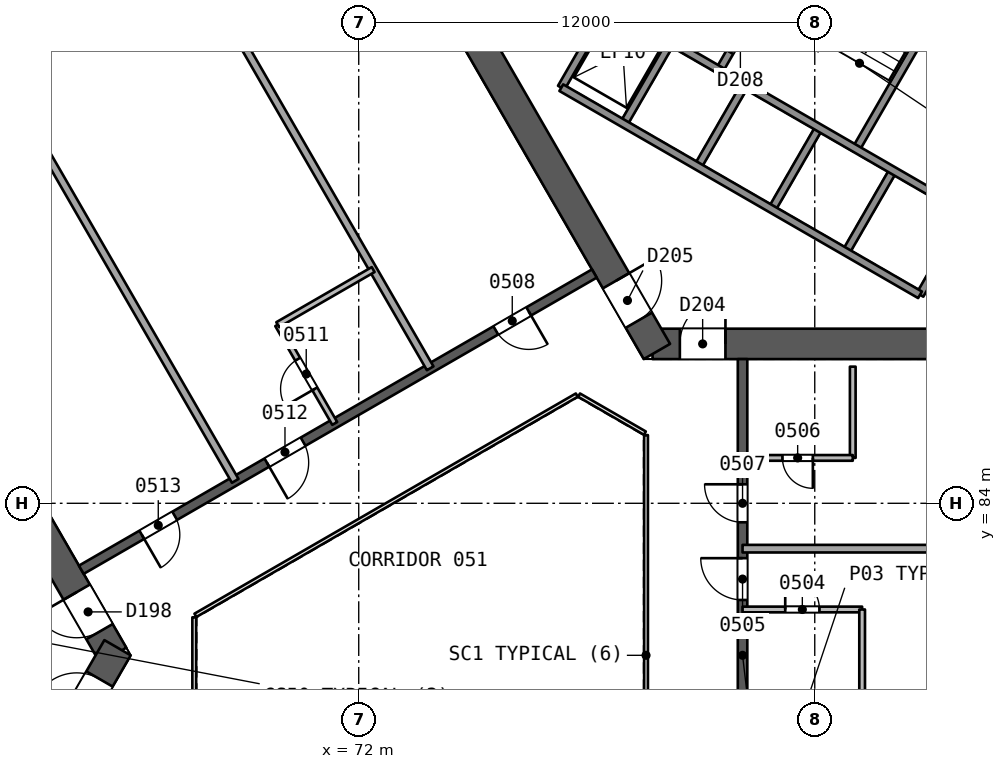
"""IFC4 building model, lengths in metres.
Left out: names, types, materials, properties, quantities, classifications, styles, units other than length and angle.
Written with IfcOpenShell. Run it as: python <this file> out.ifc"""

import sys

from ifc_helpers import new_model, si_unit, direction, frame, frame_2d, origin, place, context, subcontext, project, spatial, rectangle, extrude, element, fill, save


model = new_model("IFC4")
c1 = context("Model", 3, precision=1e-05, world=origin(), true_north=direction((0.0, 1.0)))
c2 = subcontext(c1, "Body", "Model", "MODEL_VIEW")
j1 = project(units=[si_unit("LENGTHUNIT", "METRE"), si_unit("PLANEANGLEUNIT", "RADIAN")], contexts=[c1])
p1 = place(None, origin())
s1 = spatial("IfcSite", under=j1, at=p1, CompositionType="ELEMENT")
p2 = place(p1, origin())
s2 = spatial("IfcBuilding", under=s1, at=p2, CompositionType="ELEMENT")
p3 = place(p2, frame((0.0, 0.0, 30.0)))
s3 = spatial("IfcBuildingStorey", under=s2, at=p3, CompositionType="ELEMENT", Elevation=30.0)
p4 = place(p3, frame((65.538, 80.0, 0.0), z_axis=(0.0, 0.0, 1.0), x_axis=(-0.49999662545, 0.866027352073, 0.0)))
e1 = element("IfcWall", 1, at=p4, inside=s3, PredefinedType="SHEAR", context=c2, shape_type="SweptSolid", body=[
    extrude(rectangle(XDim=10.149, YDim=0.8, at=frame_2d((5.074, 0.0))), origin(), (0.0, 0.0, 1.0), 3.7),
])
p5 = place(p4, frame((0.719, 0.0, 0.0)))
e2 = element("IfcOpeningElement", 2, at=p5, cuts=e1, PredefinedType="OPENING", context=c2, shape_type="SweptSolid", body=[
    extrude(rectangle(XDim=1.2, YDim=2.1, at=frame_2d((0.6, 1.05))), frame((0.0, 0.411, 0.0), z_axis=(0.0, -1.0, 0.0), x_axis=(1.0, 0.0, 0.0)), (0.0, 0.0, 1.0), 0.821),
])
p6 = place(p3, frame((60.664, 71.557, 0.0), z_axis=(0.0, 0.0, 1.0), x_axis=(0.50000409368, 0.866023040284, 0.0)))
e3 = element("IfcWall", 3, at=p6, inside=s3, PredefinedType="SHEAR", context=c2, shape_type="SweptSolid", body=[
    extrude(rectangle(XDim=9.98, YDim=0.8, at=frame_2d((4.99, 0.0))), origin(), (0.0, 0.0, 1.0), 3.7),
])
p7 = place(p6, frame((7.83, 0.0, 0.0)))
e4 = element("IfcOpeningElement", 4, at=p7, cuts=e3, PredefinedType="OPENING", context=c2, shape_type="SweptSolid", body=[
    extrude(rectangle(XDim=1.2, YDim=2.1, at=frame_2d((0.6, 1.05))), frame((0.0, 0.411, 0.0), z_axis=(0.0, -1.0, 0.0), x_axis=(1.0, 0.0, 0.0)), (0.0, 0.0, 1.0), 0.821),
])
p8 = place(p3, frame((79.731, 88.194, 0.0), z_axis=(0.0, 0.0, 1.0), x_axis=(1.0, 0.0, 0.0)))
e5 = element("IfcWall", 5, at=p8, inside=s3, PredefinedType="SHEAR", context=c2, shape_type="SweptSolid", body=[
    extrude(rectangle(XDim=10.149, YDim=0.8, at=frame_2d((5.074, 0.0))), origin(), (0.0, 0.0, 1.0), 3.7),
])
p9 = place(p8, frame((0.719, 0.0, 0.0)))
e6 = element("IfcOpeningElement", 6, at=p9, cuts=e5, PredefinedType="OPENING", context=c2, shape_type="SweptSolid", body=[
    extrude(rectangle(XDim=1.2, YDim=2.1, at=frame_2d((0.6, 1.05))), frame((0.0, 0.411, 0.0), z_axis=(0.0, -1.0, 0.0), x_axis=(1.0, 0.0, 0.0)), (0.0, 0.0, 1.0), 0.821),
])
p10 = place(p3, frame((74.856, 96.637, 0.0), z_axis=(0.0, 0.0, 1.0), x_axis=(0.499993500917, -0.866029155999, 0.0)))
e7 = element("IfcWall", 7, at=p10, inside=s3, PredefinedType="SHEAR", context=c2, shape_type="SweptSolid", body=[
    extrude(rectangle(XDim=9.98, YDim=0.8, at=frame_2d((4.99, 0.0))), origin(), (0.0, 0.0, 1.0), 3.7),
])
p11 = place(p10, frame((7.83, 0.0, 0.0)))
e8 = element("IfcOpeningElement", 8, at=p11, cuts=e7, PredefinedType="OPENING", context=c2, shape_type="SweptSolid", body=[
    extrude(rectangle(XDim=1.2, YDim=2.1, at=frame_2d((0.6, 1.05))), frame((0.0, 0.411, 0.0), z_axis=(0.0, -1.0, 0.0), x_axis=(1.0, 0.0, 0.0)), (0.0, 0.0, 1.0), 0.821),
])
p12 = place(p3, frame((82.1, 72.206, 0.0), z_axis=(0.0, 0.0, 1.0), x_axis=(0.0, 1.0, 0.0)))
e9 = element("IfcWall", 9, at=p12, inside=s3, PredefinedType="SHEAR", context=c2, shape_type="SweptSolid", body=[
    extrude(rectangle(XDim=15.588, YDim=0.25, at=frame_2d((7.794, 0.0))), origin(), (0.0, 0.0, 1.0), 3.2),
])
p13 = place(p12, frame((2.618, 0.0, 0.0)))
e10 = element("IfcOpeningElement", 10, at=p13, cuts=e9, PredefinedType="OPENING", context=c2, shape_type="SweptSolid", body=[
    extrude(rectangle(XDim=1.0, YDim=2.1, at=frame_2d((0.5, 1.05))), frame((0.0, 0.135, 0.0), z_axis=(0.0, -1.0, 0.0), x_axis=(1.0, 0.0, 0.0)), (0.0, 0.0, 1.0), 0.271),
])
p14 = place(p12, frame((9.25, 0.0, 0.0)))
e11 = element("IfcOpeningElement", 11, at=p14, cuts=e9, PredefinedType="OPENING", context=c2, shape_type="SweptSolid", body=[
    extrude(rectangle(XDim=1.1, YDim=2.1, at=frame_2d((0.55, 1.05))), frame((0.0, 0.135, 0.0), z_axis=(0.0, -1.0, 0.0), x_axis=(1.0, 0.0, 0.0)), (0.0, 0.0, 1.0), 0.271),
])
p15 = place(p12, frame((11.294, 0.0, 0.0)))
e12 = element("IfcOpeningElement", 12, at=p15, cuts=e9, PredefinedType="OPENING", context=c2, shape_type="SweptSolid", body=[
    extrude(rectangle(XDim=1.0, YDim=2.1, at=frame_2d((0.5, 1.05))), frame((0.0, 0.135, 0.0), z_axis=(0.0, -1.0, 0.0), x_axis=(1.0, 0.0, 0.0)), (0.0, 0.0, 1.0), 0.271),
])
p16 = place(p3, frame((78.2, 90.046, 0.0), z_axis=(0.0, 0.0, 1.0), x_axis=(-0.866026492143, -0.499998114903, 0.0)))
e13 = element("IfcWall", 13, at=p16, inside=s3, PredefinedType="SHEAR", context=c2, shape_type="SweptSolid", body=[
    extrude(rectangle(XDim=15.588, YDim=0.25, at=frame_2d((7.794, 0.0))), origin(), (0.0, 0.0, 1.0), 3.2),
])
p17 = place(p16, frame((1.994, 0.0, 0.0)))
e14 = element("IfcOpeningElement", 14, at=p17, cuts=e13, PredefinedType="OPENING", context=c2, shape_type="SweptSolid", body=[
    extrude(rectangle(XDim=1.0, YDim=2.1, at=frame_2d((0.5, 1.05))), frame((0.0, 0.135, 0.0), z_axis=(0.0, -1.0, 0.0), x_axis=(1.0, 0.0, 0.0)), (0.0, 0.0, 1.0), 0.271),
])
p18 = place(p16, frame((8.85, 0.0, 0.0)))
e15 = element("IfcOpeningElement", 15, at=p18, cuts=e13, PredefinedType="OPENING", context=c2, shape_type="SweptSolid", body=[
    extrude(rectangle(XDim=1.1, YDim=2.1, at=frame_2d((0.55, 1.05))), frame((0.0, 0.135, 0.0), z_axis=(0.0, -1.0, 0.0), x_axis=(1.0, 0.0, 0.0)), (0.0, 0.0, 1.0), 0.271),
])
p19 = place(p16, frame((12.75, 0.0, 0.0)))
e16 = element("IfcOpeningElement", 16, at=p19, cuts=e13, PredefinedType="OPENING", context=c2, shape_type="SweptSolid", body=[
    extrude(rectangle(XDim=1.0, YDim=2.1, at=frame_2d((0.5, 1.05))), frame((0.0, 0.135, 0.0), z_axis=(0.0, -1.0, 0.0), x_axis=(1.0, 0.0, 0.0)), (0.0, 0.0, 1.0), 0.271),
])
p20 = place(p3, frame((82.1, 81.206, 0.0), z_axis=(0.0, 0.0, 1.0), x_axis=(1.0, 0.0, 0.0)))
e17 = element("IfcWall", 17, at=p20, inside=s3, PredefinedType="PARTITIONING", context=c2, shape_type="SweptSolid", body=[
    extrude(rectangle(XDim=3.147, YDim=0.15, at=frame_2d((1.573, 0.0))), origin(), (0.0, 0.0, 1.0), 3.2),
])
p21 = place(p20, frame((1.123, 0.0, 0.0)))
e18 = element("IfcOpeningElement", 18, at=p21, cuts=e17, PredefinedType="OPENING", context=c2, shape_type="SweptSolid", body=[
    extrude(rectangle(XDim=0.9, YDim=2.1, at=frame_2d((0.45, 1.05))), frame((0.0, 0.085, 0.0), z_axis=(0.0, -1.0, 0.0), x_axis=(1.0, 0.0, 0.0)), (0.0, 0.0, 1.0), 0.171),
])
p22 = place(p3, frame((85.247, 81.206, 0.0), z_axis=(0.0, 0.0, 1.0), x_axis=(0.0, -1.0, 0.0)))
e19 = element("IfcWall", 19, at=p22, inside=s3, PredefinedType="PARTITIONING", context=c2, shape_type="SweptSolid", body=[
    extrude(rectangle(XDim=2.765, YDim=0.15, at=frame_2d((1.382, 0.0))), origin(), (0.0, 0.0, 1.0), 3.2),
])
p23 = place(p3, frame((96.351, 82.806, 0.0), z_axis=(0.0, 0.0, 1.0), x_axis=(-1.0, 0.0, 0.0)))
e20 = element("IfcWall", 20, at=p23, inside=s3, PredefinedType="PARTITIONING", context=c2, shape_type="SweptSolid", body=[
    extrude(rectangle(XDim=14.251, YDim=0.2, at=frame_2d((7.125, 0.0))), origin(), (0.0, 0.0, 1.0), 3.2),
])
p24 = place(p3, frame((85.0, 87.595, 0.0), z_axis=(0.0, 0.0, 1.0), x_axis=(0.0, -1.0, 0.0)))
e21 = element("IfcWall", 21, at=p24, inside=s3, PredefinedType="PARTITIONING", context=c2, shape_type="SweptSolid", body=[
    extrude(rectangle(XDim=2.401, YDim=0.15, at=frame_2d((1.2, 0.0))), origin(), (0.0, 0.0, 1.0), 3.2),
])
p25 = place(p3, frame((85.0, 85.194, 0.0), z_axis=(0.0, 0.0, 1.0), x_axis=(-1.0, 0.0, 0.0)))
e22 = element("IfcWall", 22, at=p25, inside=s3, PredefinedType="PARTITIONING", context=c2, shape_type="SweptSolid", body=[
    extrude(rectangle(XDim=2.9, YDim=0.15, at=frame_2d((1.45, 0.0))), origin(), (0.0, 0.0, 1.0), 3.2),
])
p26 = place(p25, frame((1.05, 0.0, 0.0)))
e23 = element("IfcOpeningElement", 23, at=p26, cuts=e22, PredefinedType="OPENING", context=c2, shape_type="SweptSolid", body=[
    extrude(rectangle(XDim=0.8, YDim=2.1, at=frame_2d((0.4, 1.05))), frame((0.0, 0.085, 0.0), z_axis=(0.0, -1.0, 0.0), x_axis=(1.0, 0.0, 0.0)), (0.0, 0.0, 1.0), 0.171),
])
p27 = place(p3, frame((66.754, 99.894, 0.0), z_axis=(0.0, 0.0, 1.0), x_axis=(0.499997291418, -0.866026967579, 0.0)))
e24 = element("IfcWall", 24, at=p27, inside=s3, PredefinedType="PARTITIONING", context=c2, shape_type="SweptSolid", body=[
    extrude(rectangle(XDim=14.251, YDim=0.2, at=frame_2d((7.125, 0.0))), origin(), (0.0, 0.0, 1.0), 3.2),
])
p28 = place(p3, frame((71.368, 86.102, 0.0), z_axis=(0.0, 0.0, 1.0), x_axis=(-0.50002537861, 0.866010750942, 0.0)))
e25 = element("IfcWall", 25, at=p28, inside=s3, PredefinedType="PARTITIONING", context=c2, shape_type="SweptSolid", body=[
    extrude(rectangle(XDim=3.0, YDim=0.15, at=frame_2d((1.5, 0.0))), origin(), (0.0, 0.0, 1.0), 3.2),
])
p29 = place(p28, frame((1.05, 0.0, 0.0)))
e26 = element("IfcOpeningElement", 26, at=p29, cuts=e25, PredefinedType="OPENING", context=c2, shape_type="SweptSolid", body=[
    extrude(rectangle(XDim=0.9, YDim=2.1, at=frame_2d((0.45, 1.05))), frame((0.0, 0.085, 0.0), z_axis=(0.0, -1.0, 0.0), x_axis=(1.0, 0.0, 0.0)), (0.0, 0.0, 1.0), 0.171),
])
p30 = place(p3, frame((69.868, 88.7, 0.0), z_axis=(0.0, 0.0, 1.0), x_axis=(0.865996321171, 0.50005036918, 0.0)))
e27 = element("IfcWall", 27, at=p30, inside=s3, PredefinedType="PARTITIONING", context=c2, shape_type="SweptSolid", body=[
    extrude(rectangle(XDim=2.9, YDim=0.15, at=frame_2d((1.45, 0.0))), origin(), (0.0, 0.0, 1.0), 3.2),
])
p31 = place(p3, frame((61.625, 96.932, 0.0), z_axis=(0.0, 0.0, 1.0), x_axis=(0.499997291418, -0.866026967579, 0.0)))
e28 = element("IfcWall", 28, at=p31, inside=s3, PredefinedType="PARTITIONING", context=c2, shape_type="SweptSolid", body=[
    extrude(rectangle(XDim=14.251, YDim=0.2, at=frame_2d((7.125, 0.0))), origin(), (0.0, 0.0, 1.0), 3.2),
])
p32 = place(p3, frame((37.479, 83.163, 0.0), z_axis=(0.0, 0.0, 1.0), x_axis=(0.866024340432, 0.500001841776, 0.0)))
e29 = element("IfcWall", 29, at=p32, inside=s3, PredefinedType="SOLIDWALL", context=c2, shape_type="SweptSolid", body=[
    extrude(rectangle(XDim=61.824, YDim=0.3, at=frame_2d((30.912, 0.0))), origin(), (0.0, 0.0, 1.0), 3.2),
])
p33 = place(p32, frame((29.556, 0.0, 0.0)))
e30 = element("IfcOpeningElement", 30, at=p33, cuts=e29, PredefinedType="OPENING", context=c2, shape_type="SweptSolid", body=[
    extrude(rectangle(XDim=2.4, YDim=2.4, at=frame_2d((1.2, 1.2))), frame((0.0, 0.161, 0.0), z_axis=(0.0, -1.0, 0.0), x_axis=(1.0, 0.0, 0.0)), (0.0, 0.0, 1.0), 0.321),
])
p34 = place(p32, frame((35.012, 0.0, 0.0)))
e31 = element("IfcOpeningElement", 31, at=p34, cuts=e29, PredefinedType="OPENING", context=c2, shape_type="SweptSolid", body=[
    extrude(rectangle(XDim=2.4, YDim=2.4, at=frame_2d((1.2, 1.2))), frame((0.0, 0.161, 0.0), z_axis=(0.0, -1.0, 0.0), x_axis=(1.0, 0.0, 0.0)), (0.0, 0.0, 1.0), 0.321),
])
p35 = place(p32, frame((47.93, 0.0, 0.0)))
e32 = element("IfcOpeningElement", 32, at=p35, cuts=e29, PredefinedType="OPENING", context=c2, shape_type="SweptSolid", body=[
    extrude(rectangle(XDim=2.4, YDim=2.4, at=frame_2d((1.2, 1.2))), frame((0.0, 0.161, 0.0), z_axis=(0.0, -1.0, 0.0), x_axis=(1.0, 0.0, 0.0)), (0.0, 0.0, 1.0), 0.321),
])
p36 = place(p32, frame((24.256, 0.0, 0.0)))
e33 = element("IfcOpeningElement", 33, at=p36, cuts=e29, PredefinedType="OPENING", context=c2, shape_type="SweptSolid", body=[
    extrude(rectangle(XDim=2.4, YDim=2.4, at=frame_2d((1.2, 1.2))), frame((0.0, 0.161, 0.0), z_axis=(0.0, -1.0, 0.0), x_axis=(1.0, 0.0, 0.0)), (0.0, 0.0, 1.0), 0.321),
])
p37 = place(p32, frame((11.509, 0.0, 0.0)))
e34 = element("IfcOpeningElement", 34, at=p37, cuts=e29, PredefinedType="OPENING", context=c2, shape_type="SweptSolid", body=[
    extrude(rectangle(XDim=2.4, YDim=2.4, at=frame_2d((1.2, 1.2))), frame((0.0, 0.161, 0.0), z_axis=(0.0, -1.0, 0.0), x_axis=(1.0, 0.0, 0.0)), (0.0, 0.0, 1.0), 0.321),
])
for number, where, z_axis, x_axis in (
    (35, (86.77, 89.486, 0.0), (0.0, 0.0, 1.0), (0.5, 0.866, 0.0)),
    (36, (84.821, 90.611, 0.0), (0.0, 0.0, 1.0), (0.5, 0.866, 0.0)),
):
    element("IfcWall", number, at=place(p3, frame(where, z_axis=z_axis, x_axis=x_axis)), inside=s3, PredefinedType="SOLIDWALL", context=c2, shape_type="SweptSolid", body=[
        extrude(rectangle(XDim=2.48, YDim=0.2, at=frame_2d((1.24, 0.0))), origin(), (0.0, 0.0, 1.0), 3.2),
    ])
p38 = place(p3, frame((85.087, 93.321, 0.0), z_axis=(0.0, 0.0, 1.0), x_axis=(0.500019787375, 0.866013979237, 0.0)))
e37 = element("IfcWall", 37, at=p38, inside=s3, PredefinedType="SOLIDWALL", context=c2, shape_type="SweptSolid", body=[
    extrude(rectangle(XDim=7.7, YDim=0.2, at=frame_2d((3.85, 0.0))), origin(), (0.0, 0.0, 1.0), 3.2),
])
for number, where, z_axis, x_axis in (
    (38, (82.873, 91.736, 0.0), (0.0, 0.0, 1.0), (0.5, 0.866, 0.0)),
    (39, (80.924, 92.861, 0.0), (0.0, 0.0, 1.0), (0.5, 0.866, 0.0)),
):
    element("IfcWall", number, at=place(p3, frame(where, z_axis=z_axis, x_axis=x_axis)), inside=s3, PredefinedType="SOLIDWALL", context=c2, shape_type="SweptSolid", body=[
        extrude(rectangle(XDim=2.48, YDim=0.2, at=frame_2d((1.24, 0.0))), origin(), (0.0, 0.0, 1.0), 3.2),
    ])
p39 = place(p3, frame((81.493, 95.396, 0.0), z_axis=(0.0, 0.0, 1.0), x_axis=(0.500006057782, 0.866021906294, 0.0)))
e40 = element("IfcWall", 40, at=p39, inside=s3, PredefinedType="SOLIDWALL", context=c2, shape_type="SweptSolid", body=[
    extrude(rectangle(XDim=7.7, YDim=0.2, at=frame_2d((3.85, 0.0))), origin(), (0.0, 0.0, 1.0), 3.2),
])
p40 = place(p39, frame((0.55, 0.0, 0.0)))
e41 = element("IfcOpeningElement", 41, at=p40, cuts=e40, PredefinedType="OPENING", context=c2, shape_type="SweptSolid", body=[
    extrude(rectangle(XDim=1.1, YDim=2.1, at=frame_2d((0.55, 1.05))), frame((0.0, 0.11, 0.0), z_axis=(0.0, -1.0, 0.0), x_axis=(1.0, 0.0, 0.0)), (0.0, 0.0, 1.0), 0.221),
])
for number, where, z_axis, x_axis in (
    (42, (78.976, 93.986, 0.0), (0.0, 0.0, 1.0), (0.5, 0.866, 0.0)),
    (43, (77.33, 94.936, 0.0), (0.0, 0.0, 1.0), (0.5, 0.866, 0.0)),
):
    element("IfcWall", number, at=place(p3, frame(where, z_axis=z_axis, x_axis=x_axis)), inside=s3, PredefinedType="SOLIDWALL", context=c2, shape_type="SweptSolid", body=[
        extrude(rectangle(XDim=3.05, YDim=0.2, at=frame_2d((1.525, 0.0))), origin(), (0.0, 0.0, 1.0), 3.2),
    ])
p41 = place(p3, frame((86.77, 89.486, 0.0), z_axis=(0.0, 0.0, 1.0), x_axis=(-0.86601811187, 0.500012629753, 0.0)))
e44 = element("IfcWall", 44, at=p41, inside=s3, PredefinedType="SOLIDWALL", context=c2, shape_type="SweptSolid", body=[
    extrude(rectangle(XDim=10.9, YDim=0.2, at=frame_2d((5.45, 0.0))), origin(), (0.0, 0.0, 1.0), 3.2),
])
p42 = place(p3, frame((88.01, 91.634, 0.0), z_axis=(0.0, 0.0, 1.0), x_axis=(-0.866024315419, 0.5000018851, 0.0)))
e45 = element("IfcWall", 45, at=p42, inside=s3, PredefinedType="SOLIDWALL", context=c2, shape_type="SweptSolid", body=[
    extrude(rectangle(XDim=9.0, YDim=0.2, at=frame_2d((4.5, 0.0))), origin(), (0.0, 0.0, 1.0), 3.2),
])
p43 = place(p3, frame((79.56, 74.206, 0.0), z_axis=(0.0, 0.0, 1.0), x_axis=(0.0, 1.0, 0.0)))
e46 = element("IfcWall", 46, at=p43, inside=s3, PredefinedType="PARTITIONING", context=c2, shape_type="SweptSolid", body=[
    extrude(rectangle(XDim=11.588, YDim=0.1, at=frame_2d((5.794, 0.0))), origin(), (0.0, 0.0, 1.0), 3.2),
])
p44 = place(p3, frame((79.53, 85.846, 0.0), z_axis=(0.0, 0.0, 1.0), x_axis=(-0.866041268327, 0.499972520799, 0.0)))
e47 = element("IfcWall", 47, at=p44, inside=s3, PredefinedType="PARTITIONING", context=c2, shape_type="SweptSolid", body=[
    extrude(rectangle(XDim=2.0, YDim=0.1, at=frame_2d((1.0, 0.0))), origin(), (0.0, 0.0, 1.0), 3.2),
])
p45 = place(p3, frame((77.738, 86.846, 0.0), z_axis=(0.0, 0.0, 1.0), x_axis=(-0.866026658274, -0.499997827154, 0.0)))
e48 = element("IfcWall", 48, at=p45, inside=s3, PredefinedType="PARTITIONING", context=c2, shape_type="SweptSolid", body=[
    extrude(rectangle(XDim=11.588, YDim=0.1, at=frame_2d((5.794, 0.0))), origin(), (0.0, 0.0, 1.0), 3.2),
])
p46 = place(p3, frame((67.672, 81.0, 0.0), z_axis=(0.0, 0.0, 1.0), x_axis=(0.0, -1.0, 0.0)))
e49 = element("IfcWall", 49, at=p46, inside=s3, PredefinedType="PARTITIONING", context=c2, shape_type="SweptSolid", body=[
    extrude(rectangle(XDim=2.0, YDim=0.1, at=frame_2d((1.0, 0.0))), origin(), (0.0, 0.0, 1.0), 3.2),
])
p47 = place(p21, origin())
e50 = element("IfcDoor", 50, at=p47, inside=s3, OperationType="SINGLE_SWING_LEFT", PredefinedType="NOTDEFINED", context=c2, shape_type="SweptSolid", body=[
    extrude(rectangle(XDim=0.9, YDim=2.1, at=frame_2d((0.45, 1.05))), frame((0.0, 0.025, 0.0), z_axis=(0.0, -1.0, 0.0), x_axis=(1.0, 0.0, 0.0)), (0.0, 0.0, 1.0), 0.05),
])
fill(e18, e50)
p48 = place(p14, origin())
e51 = element("IfcDoor", 51, at=p48, inside=s3, OperationType="SINGLE_SWING_RIGHT", PredefinedType="NOTDEFINED", context=c2, shape_type="SweptSolid", body=[
    extrude(rectangle(XDim=1.1, YDim=2.1, at=frame_2d((0.55, 1.05))), frame((0.0, 0.025, 0.0), z_axis=(0.0, -1.0, 0.0), x_axis=(1.0, 0.0, 0.0)), (0.0, 0.0, 1.0), 0.05),
])
fill(e11, e51)
p49 = place(p26, origin())
e52 = element("IfcDoor", 52, at=p49, inside=s3, OperationType="SINGLE_SWING_LEFT", PredefinedType="NOTDEFINED", context=c2, shape_type="SweptSolid", body=[
    extrude(rectangle(XDim=0.8, YDim=2.1, at=frame_2d((0.4, 1.05))), frame((0.0, 0.025, 0.0), z_axis=(0.0, -1.0, 0.0), x_axis=(1.0, 0.0, 0.0)), (0.0, 0.0, 1.0), 0.05),
])
fill(e23, e52)
p50 = place(p15, origin())
e53 = element("IfcDoor", 53, at=p50, inside=s3, OperationType="SINGLE_SWING_RIGHT", PredefinedType="NOTDEFINED", context=c2, shape_type="SweptSolid", body=[
    extrude(rectangle(XDim=1.0, YDim=2.1, at=frame_2d((0.5, 1.05))), frame((0.0, 0.025, 0.0), z_axis=(0.0, -1.0, 0.0), x_axis=(1.0, 0.0, 0.0)), (0.0, 0.0, 1.0), 0.05),
])
fill(e12, e53)
p51 = place(p17, origin())
e54 = element("IfcDoor", 54, at=p51, inside=s3, OperationType="SINGLE_SWING_LEFT", PredefinedType="NOTDEFINED", context=c2, shape_type="SweptSolid", body=[
    extrude(rectangle(XDim=1.0, YDim=2.1, at=frame_2d((0.5, 1.05))), frame((0.0, 0.025, 0.0), z_axis=(0.0, -1.0, 0.0), x_axis=(1.0, 0.0, 0.0)), (0.0, 0.0, 1.0), 0.05),
])
fill(e14, e54)
p52 = place(p29, origin())
e55 = element("IfcDoor", 55, at=p52, inside=s3, OperationType="SINGLE_SWING_LEFT", PredefinedType="NOTDEFINED", context=c2, shape_type="SweptSolid", body=[
    extrude(rectangle(XDim=0.9, YDim=2.1, at=frame_2d((0.45, 1.05))), frame((0.0, 0.025, 0.0), z_axis=(0.0, -1.0, 0.0), x_axis=(1.0, 0.0, 0.0)), (0.0, 0.0, 1.0), 0.05),
])
fill(e26, e55)
p53 = place(p18, origin())
e56 = element("IfcDoor", 56, at=p53, inside=s3, OperationType="SINGLE_SWING_RIGHT", PredefinedType="NOTDEFINED", context=c2, shape_type="SweptSolid", body=[
    extrude(rectangle(XDim=1.1, YDim=2.1, at=frame_2d((0.55, 1.05))), frame((0.0, 0.025, 0.0), z_axis=(0.0, -1.0, 0.0), x_axis=(1.0, 0.0, 0.0)), (0.0, 0.0, 1.0), 0.05),
])
fill(e15, e56)
p54 = place(p19, origin())
e57 = element("IfcDoor", 57, at=p54, inside=s3, OperationType="SINGLE_SWING_RIGHT", PredefinedType="NOTDEFINED", context=c2, shape_type="SweptSolid", body=[
    extrude(rectangle(XDim=1.0, YDim=2.1, at=frame_2d((0.5, 1.05))), frame((0.0, 0.025, 0.0), z_axis=(0.0, -1.0, 0.0), x_axis=(1.0, 0.0, 0.0)), (0.0, 0.0, 1.0), 0.05),
])
fill(e16, e57)
p55 = place(p5, origin())
e58 = element("IfcDoor", 58, at=p55, inside=s3, OperationType="SINGLE_SWING_RIGHT", PredefinedType="NOTDEFINED", context=c2, shape_type="SweptSolid", body=[
    extrude(rectangle(XDim=1.2, YDim=2.1, at=frame_2d((0.6, 1.05))), frame((0.0, 0.025, 0.0), z_axis=(0.0, -1.0, 0.0), x_axis=(1.0, 0.0, 0.0)), (0.0, 0.0, 1.0), 0.05),
])
fill(e2, e58)
p56 = place(p7, origin())
e59 = element("IfcDoor", 59, at=p56, inside=s3, OperationType="SINGLE_SWING_LEFT", PredefinedType="NOTDEFINED", context=c2, shape_type="SweptSolid", body=[
    extrude(rectangle(XDim=1.2, YDim=2.1, at=frame_2d((0.6, 1.05))), frame((0.0, 0.025, 0.0), z_axis=(0.0, -1.0, 0.0), x_axis=(1.0, 0.0, 0.0)), (0.0, 0.0, 1.0), 0.05),
])
fill(e4, e59)
p57 = place(p9, origin())
e60 = element("IfcDoor", 60, at=p57, inside=s3, OperationType="SINGLE_SWING_RIGHT", PredefinedType="NOTDEFINED", context=c2, shape_type="SweptSolid", body=[
    extrude(rectangle(XDim=1.2, YDim=2.1, at=frame_2d((0.6, 1.05))), frame((0.0, 0.025, 0.0), z_axis=(0.0, -1.0, 0.0), x_axis=(1.0, 0.0, 0.0)), (0.0, 0.0, 1.0), 0.05),
])
fill(e6, e60)
p58 = place(p11, origin())
e61 = element("IfcDoor", 61, at=p58, inside=s3, OperationType="SINGLE_SWING_LEFT", PredefinedType="NOTDEFINED", context=c2, shape_type="SweptSolid", body=[
    extrude(rectangle(XDim=1.2, YDim=2.1, at=frame_2d((0.6, 1.05))), frame((0.0, 0.025, 0.0), z_axis=(0.0, -1.0, 0.0), x_axis=(1.0, 0.0, 0.0)), (0.0, 0.0, 1.0), 0.05),
])
fill(e8, e61)
p59 = place(p40, origin())
e62 = element("IfcDoor", 62, at=p59, inside=s3, OperationType="SINGLE_SWING_RIGHT", PredefinedType="NOTDEFINED", context=c2, shape_type="SweptSolid", body=[
    extrude(rectangle(XDim=1.1, YDim=2.1, at=frame_2d((0.55, 1.05))), frame((0.0, 0.025, 0.0), z_axis=(0.0, -1.0, 0.0), x_axis=(1.0, 0.0, 0.0)), (0.0, 0.0, 1.0), 0.05),
])
fill(e41, e62)
save(model, sys.argv[1])
